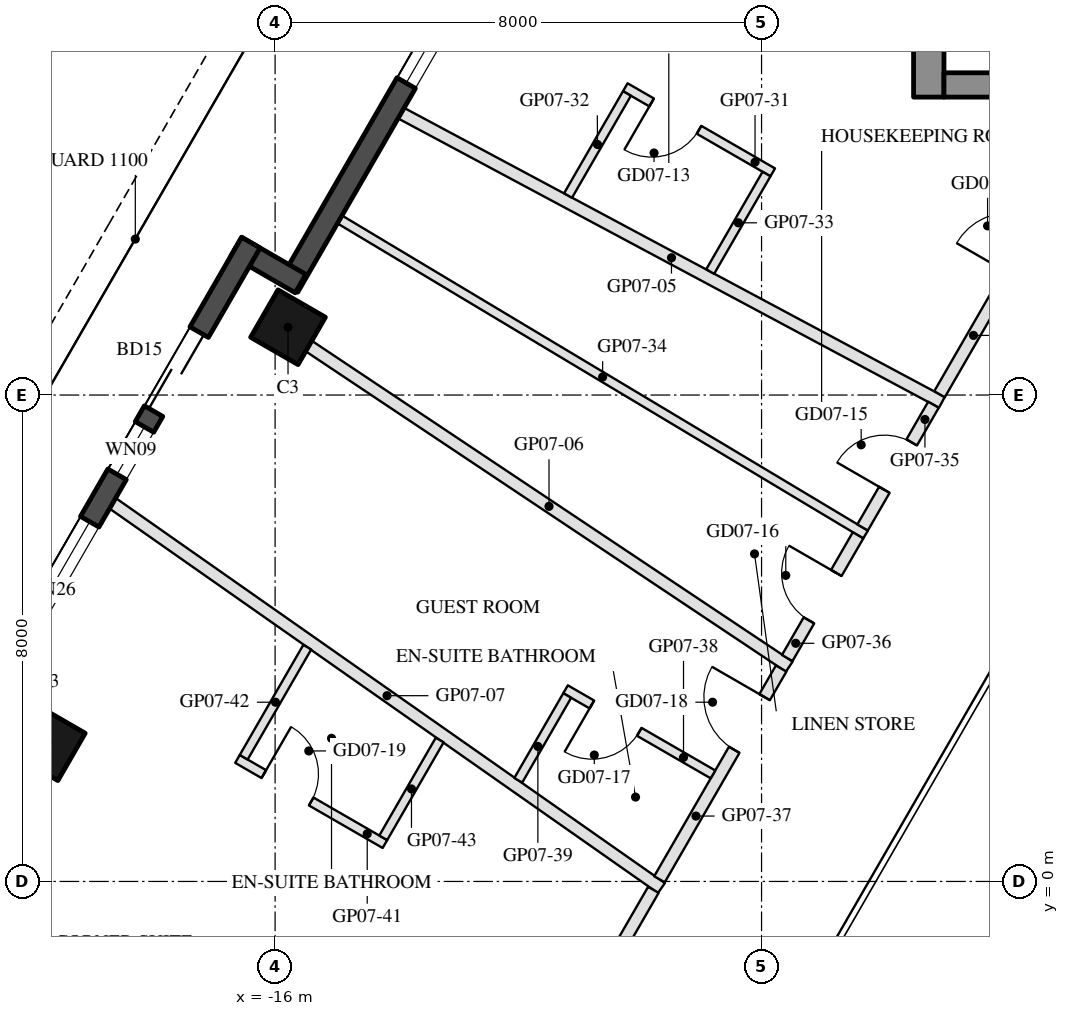
"""IFC4 building model, lengths in metres.
Left out: names, types, materials, properties, quantities, classifications, styles, units other than length and angle.
Written with IfcOpenShell. Run it as: python <this file> out.ifc"""

import sys

from ifc_helpers import new_model, si_unit, direction, frame, frame_2d, origin, origin_2d, place, context, subcontext, project, spatial, rectangle, hollow_rectangle, extrude, element, fill, save


model = new_model("IFC4")
c1 = context("Model", 3, precision=1e-05, world=origin(), true_north=direction((0.0, 1.0)))
c2 = subcontext(c1, "Body", "Model", "MODEL_VIEW")
j1 = project(units=[si_unit("LENGTHUNIT", "METRE"), si_unit("PLANEANGLEUNIT", "RADIAN")], contexts=[c1])
p1 = place(None, origin())
s1 = spatial("IfcSite", under=j1, at=p1, CompositionType="ELEMENT")
p2 = place(p1, origin())
s2 = spatial("IfcBuilding", under=s1, at=p2, CompositionType="ELEMENT")
p3 = place(p2, frame((0.0, 0.0, 98.3)))
s3 = spatial("IfcBuildingStorey", under=s2, at=p3, CompositionType="ELEMENT", Elevation=98.3)
for number, where, z_axis, x_axis in (
    (1, (-15.788, 9.115, 0.0), (0.0, 0.0, 1.0), (0.5, 0.866, 0.0)),
    (2, (-19.738, 2.273, 0.0), (0.0, 0.0, 1.0), (0.5, 0.866, 0.0)),
):
    element("IfcColumn", number, at=place(p3, frame(where, z_axis=z_axis, x_axis=x_axis)), inside=s3, PredefinedType="COLUMN", context=c2, shape_type="SweptSolid", body=[
        extrude(hollow_rectangle(XDim=0.9, YDim=0.9, WallThickness=0.04, at=origin_2d()), origin(), (0.0, 0.0, 1.0), 3.7),
    ])
p4 = place(p3, frame((-12.409, 15.617, 0.0), z_axis=(0.0, 0.0, 1.0), x_axis=(-0.500003597184, -0.866023326939, 0.0)))
e3 = element("IfcWall", 3, at=p4, inside=s3, PredefinedType="SOLIDWALL", context=c2, shape_type="SweptSolid", body=[
    extrude(rectangle(XDim=6.74, YDim=0.35, at=frame_2d((3.37, 0.0))), origin(), (0.0, 0.0, 1.0), 3.55),
])
p5 = place(p4, frame((0.77, 0.0, 0.3)))
e4 = element("IfcOpeningElement", 4, at=p5, cuts=e3, PredefinedType="OPENING", context=c2, shape_type="SweptSolid", body=[
    extrude(rectangle(XDim=2.1, YDim=2.65, at=frame_2d((1.05, 1.325))), frame((0.0, 0.185, 0.0), z_axis=(0.0, -1.0, 0.0), x_axis=(1.0, 0.0, 0.0)), (0.0, 0.0, 1.0), 0.37),
])
p6 = place(p3, frame((-15.581, 9.833, 0.0), z_axis=(0.0, 0.0, 1.0), x_axis=(-0.866055662726, 0.499947586314, 0.0)))
e5 = element("IfcWall", 5, at=p6, inside=s3, PredefinedType="SOLIDWALL", context=c2, shape_type="SweptSolid", body=[
    extrude(rectangle(XDim=1.22, YDim=0.35, at=frame_2d((0.61, 0.0))), origin(), (0.0, 0.0, 1.0), 3.55),
])
p7 = place(p3, frame((-16.398, 10.507, 0.0), z_axis=(0.0, 0.0, 1.0), x_axis=(-0.499999142773, -0.866025898704, 0.0)))
e6 = element("IfcWall", 6, at=p7, inside=s3, PredefinedType="SOLIDWALL", context=c2, shape_type="SweptSolid", body=[
    extrude(rectangle(XDim=9.7, YDim=0.35, at=frame_2d((4.85, 0.0))), origin(), (0.0, 0.0, 1.0), 3.55),
])
p8 = place(p7, frame((1.7, 0.0, 0.0)))
e7 = element("IfcOpeningElement", 7, at=p8, cuts=e6, PredefinedType="OPENING", context=c2, shape_type="SweptSolid", body=[
    extrude(rectangle(XDim=1.5, YDim=2.4, at=frame_2d((0.75, 1.2))), frame((0.0, 0.185, 0.0), z_axis=(0.0, -1.0, 0.0), x_axis=(1.0, 0.0, 0.0)), (0.0, 0.0, 1.0), 0.37),
])
p9 = place(p7, frame((3.5, 0.0, 0.3)))
e8 = element("IfcOpeningElement", 8, at=p9, cuts=e6, PredefinedType="OPENING", context=c2, shape_type="SweptSolid", body=[
    extrude(rectangle(XDim=0.9, YDim=2.65, at=frame_2d((0.45, 1.325))), frame((0.0, 0.185, 0.0), z_axis=(0.0, -1.0, 0.0), x_axis=(1.0, 0.0, 0.0)), (0.0, 0.0, 1.0), 0.37),
])
p10 = place(p7, frame((5.301, 0.0, 0.3)))
e9 = element("IfcOpeningElement", 9, at=p10, cuts=e6, PredefinedType="OPENING", context=c2, shape_type="SweptSolid", body=[
    extrude(rectangle(XDim=2.6, YDim=2.65, at=frame_2d((1.3, 1.325))), frame((0.0, 0.185, 0.0), z_axis=(0.0, -1.0, 0.0), x_axis=(1.0, 0.0, 0.0)), (0.0, 0.0, 1.0), 0.37),
])
p11 = place(p3, frame((-5.25, 12.9, 0.0), z_axis=(0.0, 0.0, 1.0), x_axis=(0.0, 1.0, 0.0)))
e10 = element("IfcWall", 10, at=p11, inside=s3, PredefinedType="SHEAR", context=c2, shape_type="SweptSolid", body=[
    extrude(rectangle(XDim=14.837, YDim=0.5, at=frame_2d((7.418, 0.0))), origin(), (0.0, 0.0, 1.0), 3.5),
])
p12 = place(p3, frame((5.0, 13.1, 0.0), z_axis=(0.0, 0.0, 1.0), x_axis=(-1.0, 0.0, 0.0)))
e11 = element("IfcWall", 11, at=p12, inside=s3, PredefinedType="SHEAR", context=c2, shape_type="SweptSolid", body=[
    extrude(rectangle(XDim=10.0, YDim=0.4, at=frame_2d((5.0, 0.0))), origin(), (0.0, 0.0, 1.0), 3.5),
])
p13 = place(p12, frame((3.55, 0.0, 0.0)))
e12 = element("IfcOpeningElement", 12, at=p13, cuts=e11, PredefinedType="OPENING", context=c2, shape_type="SweptSolid", body=[
    extrude(rectangle(XDim=1.1, YDim=2.1, at=frame_2d((0.55, 1.05))), frame((0.0, 0.21, 0.0), z_axis=(0.0, -1.0, 0.0), x_axis=(1.0, 0.0, 0.0)), (0.0, 0.0, 1.0), 0.42),
])
p14 = place(p12, frame((5.85, 0.0, 0.0)))
e13 = element("IfcOpeningElement", 13, at=p14, cuts=e11, PredefinedType="OPENING", context=c2, shape_type="SweptSolid", body=[
    extrude(rectangle(XDim=1.4, YDim=2.1, at=frame_2d((0.7, 1.05))), frame((0.0, 0.21, 0.0), z_axis=(0.0, -1.0, 0.0), x_axis=(1.0, 0.0, 0.0)), (0.0, 0.0, 1.0), 0.42),
])
p15 = place(p3, frame((-13.928, 12.636, 0.0), z_axis=(0.0, 0.0, 1.0), x_axis=(0.881791431821, -0.471639555981, 0.0)))
e14 = element("IfcWall", 14, at=p15, inside=s3, PredefinedType="PARTITIONING", context=c2, shape_type="SweptSolid", body=[
    extrude(rectangle(XDim=10.085, YDim=0.2, at=frame_2d((5.042, 0.0))), origin(), (0.0, 0.0, 1.0), 2.95),
])
p16 = place(p3, frame((-15.447, 8.806, 0.0), z_axis=(0.0, 0.0, 1.0), x_axis=(0.831801127359, -0.55507376494, 0.0)))
e15 = element("IfcWall", 15, at=p16, inside=s3, PredefinedType="PARTITIONING", context=c2, shape_type="SweptSolid", body=[
    extrude(rectangle(XDim=9.5, YDim=0.2, at=frame_2d((4.75, 0.0))), origin(), (0.0, 0.0, 1.0), 2.95),
])
p17 = place(p3, frame((-18.672, 6.219, 0.0), z_axis=(0.0, 0.0, 1.0), x_axis=(0.81879048929, -0.574092444341, 0.0)))
e16 = element("IfcWall", 16, at=p17, inside=s3, PredefinedType="PARTITIONING", context=c2, shape_type="SweptSolid", body=[
    extrude(rectangle(XDim=11.023, YDim=0.2, at=frame_2d((5.511, 0.0))), origin(), (0.0, 0.0, 1.0), 2.95),
])
p18 = place(p3, frame((-5.073, 8.013, 0.0), z_axis=(0.0, 0.0, 1.0), x_axis=(0.500003731568, 0.866023249352, 0.0)))
e17 = element("IfcWall", 17, at=p18, inside=s3, PredefinedType="PARTITIONING", context=c2, shape_type="SweptSolid", body=[
    extrude(rectangle(XDim=5.585, YDim=0.2, at=frame_2d((2.792, 0.0))), origin(), (0.0, 0.0, 1.0), 2.95),
])
p19 = place(p18, frame((2.292, 0.0, 0.0)))
e18 = element("IfcOpeningElement", 18, at=p19, cuts=e17, PredefinedType="OPENING", context=c2, shape_type="SweptSolid", body=[
    extrude(rectangle(XDim=1.0, YDim=2.1, at=frame_2d((0.5, 1.05))), frame((0.0, 0.11, 0.0), z_axis=(0.0, -1.0, 0.0), x_axis=(1.0, 0.0, 0.0)), (0.0, 0.0, 1.0), 0.22),
])
p20 = place(p3, frame((-7.816, 11.662, 0.0), z_axis=(0.0, 0.0, 1.0), x_axis=(-0.865996816683, 0.500049511043, 0.0)))
e19 = element("IfcWall", 19, at=p20, inside=s3, PredefinedType="PARTITIONING", context=c2, shape_type="SweptSolid", body=[
    extrude(rectangle(XDim=2.8, YDim=0.15, at=frame_2d((1.4, 0.0))), origin(), (0.0, 0.0, 1.0), 3.55),
])
p21 = place(p20, frame((1.4, 0.0, 0.0)))
e20 = element("IfcOpeningElement", 20, at=p21, cuts=e19, PredefinedType="OPENING", context=c2, shape_type="SweptSolid", body=[
    extrude(rectangle(XDim=0.9, YDim=2.1, at=frame_2d((0.45, 1.05))), frame((0.0, 0.085, 0.0), z_axis=(0.0, -1.0, 0.0), x_axis=(1.0, 0.0, 0.0)), (0.0, 0.0, 1.0), 0.17),
])
p22 = place(p3, frame((-10.213, 12.96, 0.0), z_axis=(0.0, 0.0, 1.0), x_axis=(-0.500013181875, -0.866017793092, 0.0)))
e21 = element("IfcWall", 21, at=p22, inside=s3, PredefinedType="PARTITIONING", context=c2, shape_type="SweptSolid", body=[
    extrude(rectangle(XDim=1.938, YDim=0.15, at=frame_2d((0.969, 0.0))), origin(), (0.0, 0.0, 1.0), 3.55),
])
p23 = place(p3, frame((-7.918, 11.635, 0.0), z_axis=(0.0, 0.0, 1.0), x_axis=(-0.499924019097, -0.866069266935, 0.0)))
e22 = element("IfcWall", 22, at=p23, inside=s3, PredefinedType="PARTITIONING", context=c2, shape_type="SweptSolid", body=[
    extrude(rectangle(XDim=1.852, YDim=0.15, at=frame_2d((0.926, 0.0))), origin(), (0.0, 0.0, 1.0), 3.55),
])
p24 = place(p3, frame((-14.937, 10.888, 0.0), z_axis=(0.0, 0.0, 1.0), x_axis=(0.857798338883, -0.513986390685, 0.0)))
e23 = element("IfcWall", 23, at=p24, inside=s3, PredefinedType="PARTITIONING", context=c2, shape_type="SweptSolid", body=[
    extrude(rectangle(XDim=10.081, YDim=0.15, at=frame_2d((5.041, 0.0))), origin(), (0.0, 0.0, 1.0), 2.96),
])
p25 = place(p3, frame((-6.338, 5.823, 0.0), z_axis=(0.0, 0.0, 1.0), x_axis=(0.499982502246, 0.866035505882, 0.0)))
e24 = element("IfcWall", 24, at=p25, inside=s3, PredefinedType="PARTITIONING", context=c2, shape_type="SweptSolid", body=[
    extrude(rectangle(XDim=2.33, YDim=0.2, at=frame_2d((1.165, 0.0))), origin(), (0.0, 0.0, 1.0), 2.95),
])
p26 = place(p25, frame((0.715, 0.0, 0.0)))
e25 = element("IfcOpeningElement", 25, at=p26, cuts=e24, PredefinedType="OPENING", context=c2, shape_type="SweptSolid", body=[
    extrude(rectangle(XDim=0.9, YDim=2.1, at=frame_2d((0.45, 1.05))), frame((0.0, 0.11, 0.0), z_axis=(0.0, -1.0, 0.0), x_axis=(1.0, 0.0, 0.0)), (0.0, 0.0, 1.0), 0.22),
])
p27 = place(p3, frame((-7.578, 3.675, 0.0), z_axis=(0.0, 0.0, 1.0), x_axis=(0.500061095026, 0.865990127681, 0.0)))
e26 = element("IfcWall", 26, at=p27, inside=s3, PredefinedType="PARTITIONING", context=c2, shape_type="SweptSolid", body=[
    extrude(rectangle(XDim=2.33, YDim=0.2, at=frame_2d((1.165, 0.0))), origin(), (0.0, 0.0, 1.0), 2.95),
])
p28 = place(p27, frame((0.715, 0.0, 0.0)))
e27 = element("IfcOpeningElement", 27, at=p28, cuts=e26, PredefinedType="OPENING", context=c2, shape_type="SweptSolid", body=[
    extrude(rectangle(XDim=0.9, YDim=2.1, at=frame_2d((0.45, 1.05))), frame((0.0, 0.11, 0.0), z_axis=(0.0, -1.0, 0.0), x_axis=(1.0, 0.0, 0.0)), (0.0, 0.0, 1.0), 0.22),
])
p29 = place(p3, frame((-9.679, 0.036, 0.0), z_axis=(0.0, 0.0, 1.0), x_axis=(0.499977712642, 0.866038271014, 0.0)))
e28 = element("IfcWall", 28, at=p29, inside=s3, PredefinedType="PARTITIONING", context=c2, shape_type="SweptSolid", body=[
    extrude(rectangle(XDim=4.002, YDim=0.2, at=frame_2d((2.001, 0.0))), origin(), (0.0, 0.0, 1.0), 2.95),
])
p30 = place(p29, frame((2.459, 0.0, 0.0)))
e29 = element("IfcOpeningElement", 29, at=p30, cuts=e28, PredefinedType="OPENING", context=c2, shape_type="SweptSolid", body=[
    extrude(rectangle(XDim=1.0, YDim=2.1, at=frame_2d((0.5, 1.05))), frame((0.0, 0.11, 0.0), z_axis=(0.0, -1.0, 0.0), x_axis=(1.0, 0.0, 0.0)), (0.0, 0.0, 1.0), 0.22),
])
p31 = place(p3, frame((-8.799, 1.76, 0.0), z_axis=(0.0, 0.0, 1.0), x_axis=(-0.866034573852, 0.49998411664, 0.0)))
e30 = element("IfcWall", 30, at=p31, inside=s3, PredefinedType="PARTITIONING", context=c2, shape_type="SweptSolid", body=[
    extrude(rectangle(XDim=2.8, YDim=0.15, at=frame_2d((1.4, 0.0))), origin(), (0.0, 0.0, 1.0), 3.55),
])
p32 = place(p31, frame((1.4, 0.0, 0.0)))
e31 = element("IfcOpeningElement", 31, at=p32, cuts=e30, PredefinedType="OPENING", context=c2, shape_type="SweptSolid", body=[
    extrude(rectangle(XDim=0.9, YDim=2.1, at=frame_2d((0.45, 1.05))), frame((0.0, 0.085, 0.0), z_axis=(0.0, -1.0, 0.0), x_axis=(1.0, 0.0, 0.0)), (0.0, 0.0, 1.0), 0.17),
])
p33 = place(p3, frame((-11.196, 3.058, 0.0), z_axis=(0.0, 0.0, 1.0), x_axis=(-0.500085588237, -0.865975983754, 0.0)))
e32 = element("IfcWall", 32, at=p33, inside=s3, PredefinedType="PARTITIONING", context=c2, shape_type="SweptSolid", body=[
    extrude(rectangle(XDim=1.61, YDim=0.15, at=frame_2d((0.805, 0.0))), origin(), (0.0, 0.0, 1.0), 2.95),
])
p34 = place(p3, frame((-12.269, -4.45, 0.0), z_axis=(0.0, 0.0, 1.0), x_axis=(0.500015331954, 0.866016551696, 0.0)))
e33 = element("IfcWall", 33, at=p34, inside=s3, PredefinedType="PARTITIONING", context=c2, shape_type="SweptSolid", body=[
    extrude(rectangle(XDim=4.979, YDim=0.2, at=frame_2d((2.489, 0.0))), origin(), (0.0, 0.0, 1.0), 2.95),
])
p35 = place(p34, frame((1.99, 0.0, 0.0)))
e34 = element("IfcOpeningElement", 34, at=p35, cuts=e33, PredefinedType="OPENING", context=c2, shape_type="SweptSolid", body=[
    extrude(rectangle(XDim=1.0, YDim=2.1, at=frame_2d((0.5, 1.05))), frame((0.0, 0.11, 0.0), z_axis=(0.0, -1.0, 0.0), x_axis=(1.0, 0.0, 0.0)), (0.0, 0.0, 1.0), 0.22),
])
p36 = place(p3, frame((-16.619, 2.015, 0.0), z_axis=(0.0, 0.0, 1.0), x_axis=(0.865996816683, -0.500049511043, 0.0)))
e35 = element("IfcWall", 35, at=p36, inside=s3, PredefinedType="PARTITIONING", context=c2, shape_type="SweptSolid", body=[
    extrude(rectangle(XDim=2.8, YDim=0.15, at=frame_2d((1.4, 0.0))), origin(), (0.0, 0.0, 1.0), 3.55),
])
p37 = place(p36, frame((0.5, 0.0, 0.0)))
e36 = element("IfcOpeningElement", 36, at=p37, cuts=e35, PredefinedType="OPENING", context=c2, shape_type="SweptSolid", body=[
    extrude(rectangle(XDim=0.9, YDim=2.1, at=frame_2d((0.45, 1.05))), frame((0.0, 0.085, 0.0), z_axis=(0.0, -1.0, 0.0), x_axis=(1.0, 0.0, 0.0)), (0.0, 0.0, 1.0), 0.17),
])
p38 = place(p3, frame((-15.471, 3.853, 0.0), z_axis=(0.0, 0.0, 1.0), x_axis=(-0.500046000743, -0.865998843614, 0.0)))
e37 = element("IfcWall", 37, at=p38, inside=s3, PredefinedType="PARTITIONING", context=c2, shape_type="SweptSolid", body=[
    extrude(rectangle(XDim=2.09, YDim=0.15, at=frame_2d((1.045, 0.0))), origin(), (0.0, 0.0, 1.0), 3.55),
])
p39 = place(p3, frame((-13.293, 2.326, 0.0), z_axis=(0.0, 0.0, 1.0), x_axis=(-0.499957702264, -0.866049823017, 0.0)))
e38 = element("IfcWall", 38, at=p39, inside=s3, PredefinedType="PARTITIONING", context=c2, shape_type="SweptSolid", body=[
    extrude(rectangle(XDim=1.857, YDim=0.15, at=frame_2d((0.928, 0.0))), origin(), (0.0, 0.0, 1.0), 3.55),
])
p40 = place(p5, origin())
e39 = element("IfcWindow", 39, at=p40, inside=s3, PartitioningType="SINGLE_PANEL", PredefinedType="WINDOW", context=c2, shape_type="SweptSolid", body=[
    extrude(rectangle(XDim=2.1, YDim=2.65, at=frame_2d((1.05, 1.325))), frame((0.0, 0.03, 0.0), z_axis=(0.0, -1.0, 0.0), x_axis=(1.0, 0.0, 0.0)), (0.0, 0.0, 1.0), 0.06),
])
fill(e4, e39)
p41 = place(p8, frame((1.5, 0.0, 0.0), z_axis=(0.0, 0.0, 1.0), x_axis=(-1.0, 0.0, 0.0)))
e40 = element("IfcDoor", 40, at=p41, inside=s3, OperationType="SLIDING_TO_LEFT", PredefinedType="DOOR", context=c2, shape_type="SweptSolid", body=[
    extrude(rectangle(XDim=1.5, YDim=2.4, at=frame_2d((0.75, 1.2))), frame((0.0, 0.025, 0.0), z_axis=(0.0, -1.0, 0.0), x_axis=(1.0, 0.0, 0.0)), (0.0, 0.0, 1.0), 0.05),
])
fill(e7, e40)
p42 = place(p9, origin())
e41 = element("IfcWindow", 41, at=p42, inside=s3, PartitioningType="SINGLE_PANEL", PredefinedType="WINDOW", context=c2, shape_type="SweptSolid", body=[
    extrude(rectangle(XDim=0.9, YDim=2.65, at=frame_2d((0.45, 1.325))), frame((0.0, 0.03, 0.0), z_axis=(0.0, -1.0, 0.0), x_axis=(1.0, 0.0, 0.0)), (0.0, 0.0, 1.0), 0.06),
])
fill(e8, e41)
p43 = place(p10, origin())
e42 = element("IfcWindow", 42, at=p43, inside=s3, PartitioningType="SINGLE_PANEL", PredefinedType="WINDOW", context=c2, shape_type="SweptSolid", body=[
    extrude(rectangle(XDim=2.6, YDim=2.65, at=frame_2d((1.3, 1.325))), frame((0.0, 0.03, 0.0), z_axis=(0.0, -1.0, 0.0), x_axis=(1.0, 0.0, 0.0)), (0.0, 0.0, 1.0), 0.06),
])
fill(e9, e42)
p44 = place(p21, origin())
e43 = element("IfcDoor", 43, at=p44, inside=s3, OperationType="SINGLE_SWING_RIGHT", PredefinedType="DOOR", context=c2, shape_type="SweptSolid", body=[
    extrude(rectangle(XDim=0.9, YDim=2.1, at=frame_2d((0.45, 1.05))), frame((0.0, 0.025, 0.0), z_axis=(0.0, -1.0, 0.0), x_axis=(1.0, 0.0, 0.0)), (0.0, 0.0, 1.0), 0.05),
])
fill(e20, e43)
p45 = place(p26, origin())
e44 = element("IfcDoor", 44, at=p45, inside=s3, OperationType="SINGLE_SWING_LEFT", PredefinedType="DOOR", context=c2, shape_type="SweptSolid", body=[
    extrude(rectangle(XDim=0.9, YDim=2.1, at=frame_2d((0.45, 1.05))), frame((0.0, 0.025, 0.0), z_axis=(0.0, -1.0, 0.0), x_axis=(1.0, 0.0, 0.0)), (0.0, 0.0, 1.0), 0.05),
])
fill(e25, e44)
p46 = place(p28, origin())
e45 = element("IfcDoor", 45, at=p46, inside=s3, OperationType="SINGLE_SWING_RIGHT", PredefinedType="DOOR", context=c2, shape_type="SweptSolid", body=[
    extrude(rectangle(XDim=0.9, YDim=2.1, at=frame_2d((0.45, 1.05))), frame((0.0, 0.025, 0.0), z_axis=(0.0, -1.0, 0.0), x_axis=(1.0, 0.0, 0.0)), (0.0, 0.0, 1.0), 0.05),
])
fill(e27, e45)
p47 = place(p32, origin())
e46 = element("IfcDoor", 46, at=p47, inside=s3, OperationType="SINGLE_SWING_RIGHT", PredefinedType="DOOR", context=c2, shape_type="SweptSolid", body=[
    extrude(rectangle(XDim=0.9, YDim=2.1, at=frame_2d((0.45, 1.05))), frame((0.0, 0.025, 0.0), z_axis=(0.0, -1.0, 0.0), x_axis=(1.0, 0.0, 0.0)), (0.0, 0.0, 1.0), 0.05),
])
fill(e31, e46)
p48 = place(p30, origin())
e47 = element("IfcDoor", 47, at=p48, inside=s3, OperationType="SINGLE_SWING_RIGHT", PredefinedType="DOOR", context=c2, shape_type="SweptSolid", body=[
    extrude(rectangle(XDim=1.0, YDim=2.1, at=frame_2d((0.5, 1.05))), frame((0.0, 0.025, 0.0), z_axis=(0.0, -1.0, 0.0), x_axis=(1.0, 0.0, 0.0)), (0.0, 0.0, 1.0), 0.05),
])
fill(e29, e47)
p49 = place(p37, origin())
e48 = element("IfcDoor", 48, at=p49, inside=s3, OperationType="SINGLE_SWING_LEFT", PredefinedType="DOOR", context=c2, shape_type="SweptSolid", body=[
    extrude(rectangle(XDim=0.9, YDim=2.1, at=frame_2d((0.45, 1.05))), frame((0.0, 0.025, 0.0), z_axis=(0.0, -1.0, 0.0), x_axis=(1.0, 0.0, 0.0)), (0.0, 0.0, 1.0), 0.05),
])
fill(e36, e48)
save(model, sys.argv[1])
